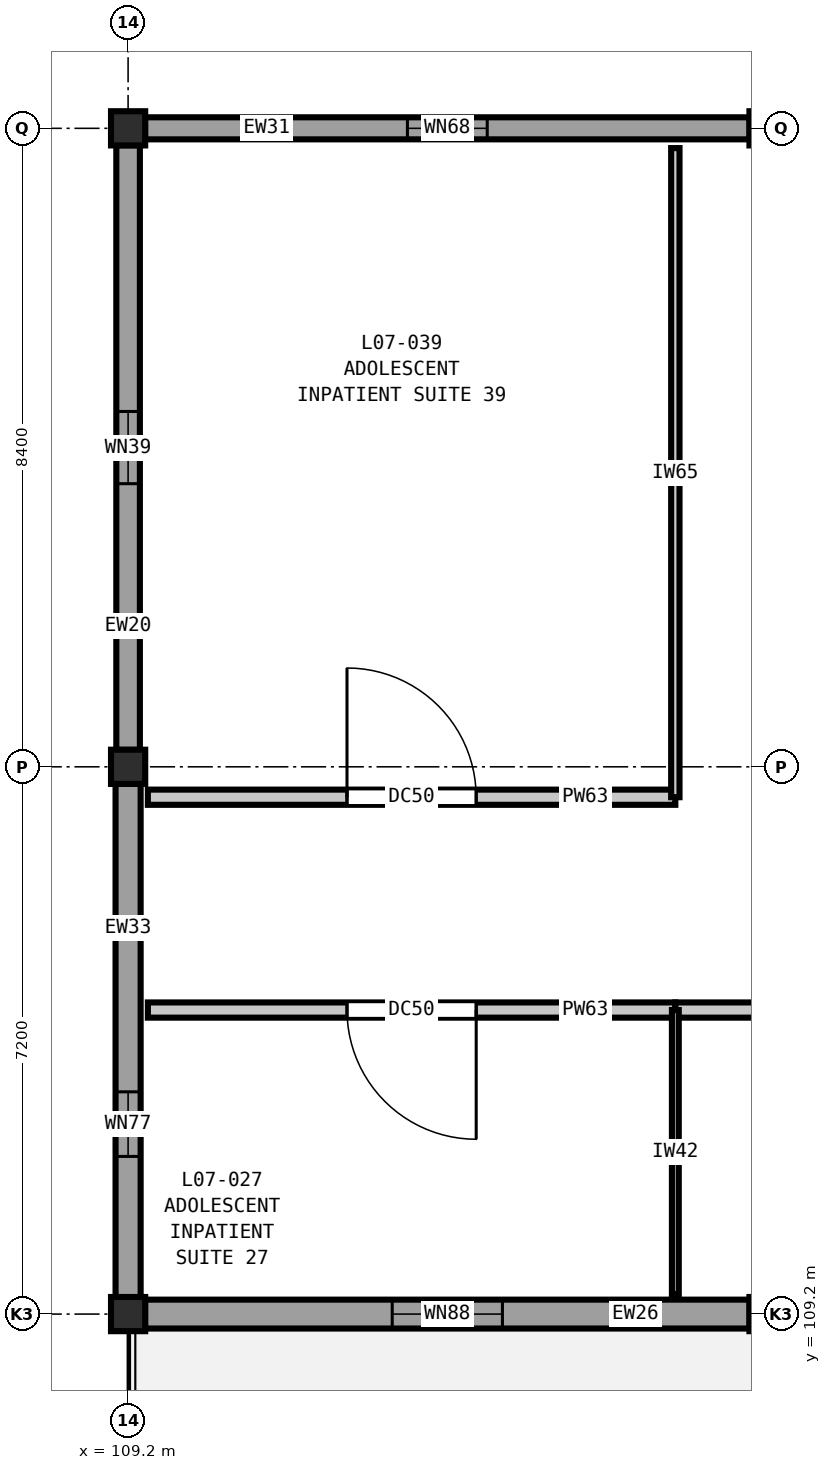
"""IFC4 building model, lengths in metres.
Left out: names, types, materials, properties, quantities, classifications, styles, units other than length and angle.
Written with IfcOpenShell. Run it as: python <this file> out.ifc"""

import sys

from ifc_helpers import new_model, si_unit, direction, frame, frame_2d, origin, origin_2d, place, context, subcontext, project, spatial, rectangle, extrude, element, fill, save


model = new_model("IFC4")
c1 = context("Model", 3, precision=1e-05, world=origin(), true_north=direction((0.0, 1.0)))
c2 = subcontext(c1, "Body", "Model", "MODEL_VIEW")
j1 = project(units=[si_unit("LENGTHUNIT", "METRE"), si_unit("PLANEANGLEUNIT", "RADIAN")], contexts=[c1])
p1 = place(None, origin())
s1 = spatial("IfcSite", under=j1, at=p1, CompositionType="ELEMENT")
p2 = place(p1, origin())
s2 = spatial("IfcBuilding", under=s1, at=p2, CompositionType="ELEMENT")
p3 = place(p2, frame((0.0, 0.0, 33.0)))
s3 = spatial("IfcBuildingStorey", under=s2, at=p3, CompositionType="ELEMENT", Elevation=33.0)
for number, where, z_axis, x_axis in (
    (1, (109.2, 109.2, 0.0), (0.0, 0.0, 1.0), (1.0, 0.0, 0.0)),
    (2, (109.2, 116.4, 0.0), (0.0, 0.0, 1.0), (1.0, 0.0, 0.0)),
    (3, (109.2, 124.8, 0.0), (0.0, 0.0, 1.0), (1.0, 0.0, 0.0)),
    (4, (117.6, 109.2, 0.0), (0.0, 0.0, 1.0), (1.0, 0.0, 0.0)),
    (5, (117.6, 124.8, 0.0), (0.0, 0.0, 1.0), (1.0, 0.0, 0.0)),
):
    element("IfcColumn", number, at=place(p3, frame(where, z_axis=z_axis, x_axis=x_axis)), inside=s3, PredefinedType="COLUMN", context=c2, shape_type="SweptSolid", body=[
        extrude(rectangle(XDim=0.45, YDim=0.45, at=origin_2d()), origin(), (0.0, 0.0, 1.0), 4.2),
    ])
p4 = place(p3, frame((109.2, 109.423, 0.0), z_axis=(0.0, 0.0, 1.0), x_axis=(0.0, 1.0, 0.0)))
e6 = element("IfcWall", 6, at=p4, inside=s3, PredefinedType="SOLIDWALL", context=c2, shape_type="SweptSolid", body=[
    extrude(rectangle(XDim=6.754, YDim=0.33, at=frame_2d((3.377, 0.0))), origin(), (0.0, 0.0, 1.0), 3.48),
])
p5 = place(p4, frame((1.851, 0.0, 0.9)))
e7 = element("IfcOpeningElement", 7, at=p5, cuts=e6, PredefinedType="OPENING", context=c2, shape_type="SweptSolid", body=[
    extrude(rectangle(XDim=0.85, YDim=1.4, at=frame_2d((0.425, 0.7))), frame((0.0, 0.175, 0.0), z_axis=(0.0, -1.0, 0.0), x_axis=(1.0, 0.0, 0.0)), (0.0, 0.0, 1.0), 0.35),
])
p6 = place(p3, frame((109.2, 116.623, 0.0), z_axis=(0.0, 0.0, 1.0), x_axis=(0.0, 1.0, 0.0)))
e8 = element("IfcWall", 8, at=p6, inside=s3, PredefinedType="SOLIDWALL", context=c2, shape_type="SweptSolid", body=[
    extrude(rectangle(XDim=7.954, YDim=0.31, at=frame_2d((3.977, 0.0))), origin(), (0.0, 0.0, 1.0), 3.48),
])
p7 = place(p6, frame((3.502, 0.0, 0.9)))
e9 = element("IfcOpeningElement", 9, at=p7, cuts=e8, PredefinedType="OPENING", context=c2, shape_type="SweptSolid", body=[
    extrude(rectangle(XDim=0.95, YDim=1.4, at=frame_2d((0.475, 0.7))), frame((0.0, 0.165, 0.0), z_axis=(0.0, -1.0, 0.0), x_axis=(1.0, 0.0, 0.0)), (0.0, 0.0, 1.0), 0.33),
])
p8 = place(p3, frame((109.423, 124.8, 0.0), z_axis=(0.0, 0.0, 1.0), x_axis=(1.0, 0.0, 0.0)))
e10 = element("IfcWall", 10, at=p8, inside=s3, PredefinedType="SOLIDWALL", context=c2, shape_type="SweptSolid", body=[
    extrude(rectangle(XDim=7.954, YDim=0.29, at=frame_2d((3.977, 0.0))), origin(), (0.0, 0.0, 1.0), 3.48),
])
p9 = place(p8, frame((3.452, 0.0, 0.9)))
e11 = element("IfcOpeningElement", 11, at=p9, cuts=e10, PredefinedType="OPENING", context=c2, shape_type="SweptSolid", body=[
    extrude(rectangle(XDim=1.05, YDim=1.4, at=frame_2d((0.525, 0.7))), frame((0.0, 0.155, 0.0), z_axis=(0.0, -1.0, 0.0), x_axis=(1.0, 0.0, 0.0)), (0.0, 0.0, 1.0), 0.31),
])
p10 = place(p3, frame((117.377, 109.2, 0.0), z_axis=(0.0, 0.0, 1.0), x_axis=(-1.0, 0.0, 0.0)))
e12 = element("IfcWall", 12, at=p10, inside=s3, PredefinedType="SOLIDWALL", context=c2, shape_type="SweptSolid", body=[
    extrude(rectangle(XDim=7.954, YDim=0.38, at=frame_2d((3.977, 0.0))), origin(), (0.0, 0.0, 1.0), 3.48),
])
p11 = place(p10, frame((3.252, 0.0, 0.9)))
e13 = element("IfcOpeningElement", 13, at=p11, cuts=e12, PredefinedType="OPENING", context=c2, shape_type="SweptSolid", body=[
    extrude(rectangle(XDim=1.45, YDim=1.75, at=frame_2d((0.725, 0.875))), frame((0.0, 0.2, 0.0), z_axis=(0.0, -1.0, 0.0), x_axis=(1.0, 0.0, 0.0)), (0.0, 0.0, 1.0), 0.4),
])
p12 = place(p3, frame((109.46, 113.2, 0.0), z_axis=(0.0, 0.0, 1.0), x_axis=(1.0, 0.0, 0.0)))
e14 = element("IfcWall", 14, at=p12, inside=s3, PredefinedType="PARTITIONING", context=c2, shape_type="SweptSolid", body=[
    extrude(rectangle(XDim=6.94, YDim=0.2, at=frame_2d((3.47, 0.0))), origin(), (0.0, 0.0, 1.0), 3.92),
])
p13 = place(p12, frame((2.62, 0.0, 0.0)))
e15 = element("IfcOpeningElement", 15, at=p13, cuts=e14, PredefinedType="OPENING", context=c2, shape_type="SweptSolid", body=[
    extrude(rectangle(XDim=1.7, YDim=2.3, at=frame_2d((0.85, 1.15))), frame((0.0, 0.11, 0.0), z_axis=(0.0, -1.0, 0.0), x_axis=(1.0, 0.0, 0.0)), (0.0, 0.0, 1.0), 0.22),
])
p14 = place(p3, frame((116.4, 113.2, 0.0), z_axis=(0.0, 0.0, 1.0), x_axis=(1.0, 0.0, 0.0)))
e16 = element("IfcWall", 16, at=p14, inside=s3, PredefinedType="PARTITIONING", context=c2, shape_type="SweptSolid", body=[
    extrude(rectangle(XDim=8.8, YDim=0.2, at=frame_2d((4.4, 0.0))), origin(), (0.0, 0.0, 1.0), 3.92),
])
p15 = place(p14, frame((3.475, 0.0, 0.0)))
e17 = element("IfcOpeningElement", 17, at=p15, cuts=e16, PredefinedType="OPENING", context=c2, shape_type="SweptSolid", body=[
    extrude(rectangle(XDim=1.85, YDim=2.3, at=frame_2d((0.925, 1.15))), frame((0.0, 0.11, 0.0), z_axis=(0.0, -1.0, 0.0), x_axis=(1.0, 0.0, 0.0)), (0.0, 0.0, 1.0), 0.22),
])
p16 = place(p3, frame((109.46, 116.0, 0.0), z_axis=(0.0, 0.0, 1.0), x_axis=(1.0, 0.0, 0.0)))
e18 = element("IfcWall", 18, at=p16, inside=s3, PredefinedType="PARTITIONING", context=c2, shape_type="SweptSolid", body=[
    extrude(rectangle(XDim=6.94, YDim=0.2, at=frame_2d((3.47, 0.0))), origin(), (0.0, 0.0, 1.0), 3.92),
])
p17 = place(p16, frame((2.62, 0.0, 0.0)))
e19 = element("IfcOpeningElement", 19, at=p17, cuts=e18, PredefinedType="OPENING", context=c2, shape_type="SweptSolid", body=[
    extrude(rectangle(XDim=1.7, YDim=2.3, at=frame_2d((0.85, 1.15))), frame((0.0, 0.11, 0.0), z_axis=(0.0, -1.0, 0.0), x_axis=(1.0, 0.0, 0.0)), (0.0, 0.0, 1.0), 0.22),
])
p18 = place(p3, frame((116.4, 109.46, 0.0), z_axis=(0.0, 0.0, 1.0), x_axis=(0.0, 1.0, 0.0)))
e20 = element("IfcWall", 20, at=p18, inside=s3, PredefinedType="PARTITIONING", context=c2, shape_type="SweptSolid", body=[
    extrude(rectangle(XDim=3.74, YDim=0.09, at=frame_2d((1.87, 0.0))), origin(), (0.0, 0.0, 1.0), 3.92),
])
p19 = place(p3, frame((116.4, 116.0, 0.0), z_axis=(0.0, 0.0, 1.0), x_axis=(0.0, 1.0, 0.0)))
e21 = element("IfcWall", 21, at=p19, inside=s3, PredefinedType="PARTITIONING", context=c2, shape_type="SweptSolid", body=[
    extrude(rectangle(XDim=8.54, YDim=0.11, at=frame_2d((4.27, 0.0))), origin(), (0.0, 0.0, 1.0), 3.92),
])
p20 = place(p5, origin())
e22 = element("IfcWindow", 22, at=p20, inside=s3, PartitioningType="SINGLE_PANEL", PredefinedType="WINDOW", context=c2, shape_type="SweptSolid", body=[
    extrude(rectangle(XDim=0.85, YDim=1.4, at=frame_2d((0.425, 0.7))), frame((0.0, 0.03, 0.0), z_axis=(0.0, -1.0, 0.0), x_axis=(1.0, 0.0, 0.0)), (0.0, 0.0, 1.0), 0.06),
])
fill(e7, e22)
p21 = place(p7, origin())
e23 = element("IfcWindow", 23, at=p21, inside=s3, PartitioningType="SINGLE_PANEL", PredefinedType="WINDOW", context=c2, shape_type="SweptSolid", body=[
    extrude(rectangle(XDim=0.95, YDim=1.4, at=frame_2d((0.475, 0.7))), frame((0.0, 0.03, 0.0), z_axis=(0.0, -1.0, 0.0), x_axis=(1.0, 0.0, 0.0)), (0.0, 0.0, 1.0), 0.06),
])
fill(e9, e23)
p22 = place(p9, origin())
e24 = element("IfcWindow", 24, at=p22, inside=s3, PartitioningType="SINGLE_PANEL", PredefinedType="WINDOW", context=c2, shape_type="SweptSolid", body=[
    extrude(rectangle(XDim=1.05, YDim=1.4, at=frame_2d((0.525, 0.7))), frame((0.0, 0.03, 0.0), z_axis=(0.0, -1.0, 0.0), x_axis=(1.0, 0.0, 0.0)), (0.0, 0.0, 1.0), 0.06),
])
fill(e11, e24)
p23 = place(p11, origin())
e25 = element("IfcWindow", 25, at=p23, inside=s3, PartitioningType="SINGLE_PANEL", PredefinedType="WINDOW", context=c2, shape_type="SweptSolid", body=[
    extrude(rectangle(XDim=1.45, YDim=1.75, at=frame_2d((0.725, 0.875))), frame((0.0, 0.03, 0.0), z_axis=(0.0, -1.0, 0.0), x_axis=(1.0, 0.0, 0.0)), (0.0, 0.0, 1.0), 0.06),
])
fill(e13, e25)
p24 = place(p13, frame((1.7, 0.0, 0.0), z_axis=(0.0, 0.0, 1.0), x_axis=(-1.0, 0.0, 0.0)))
e26 = element("IfcDoor", 26, at=p24, inside=s3, OperationType="SINGLE_SWING_LEFT", PredefinedType="DOOR", context=c2, shape_type="SweptSolid", body=[
    extrude(rectangle(XDim=1.7, YDim=2.3, at=frame_2d((0.85, 1.15))), frame((0.0, 0.025, 0.0), z_axis=(0.0, -1.0, 0.0), x_axis=(1.0, 0.0, 0.0)), (0.0, 0.0, 1.0), 0.05),
])
fill(e15, e26)
p25 = place(p17, origin())
e27 = element("IfcDoor", 27, at=p25, inside=s3, OperationType="SINGLE_SWING_LEFT", PredefinedType="DOOR", context=c2, shape_type="SweptSolid", body=[
    extrude(rectangle(XDim=1.7, YDim=2.3, at=frame_2d((0.85, 1.15))), frame((0.0, 0.025, 0.0), z_axis=(0.0, -1.0, 0.0), x_axis=(1.0, 0.0, 0.0)), (0.0, 0.0, 1.0), 0.05),
])
fill(e19, e27)
save(model, sys.argv[1])
